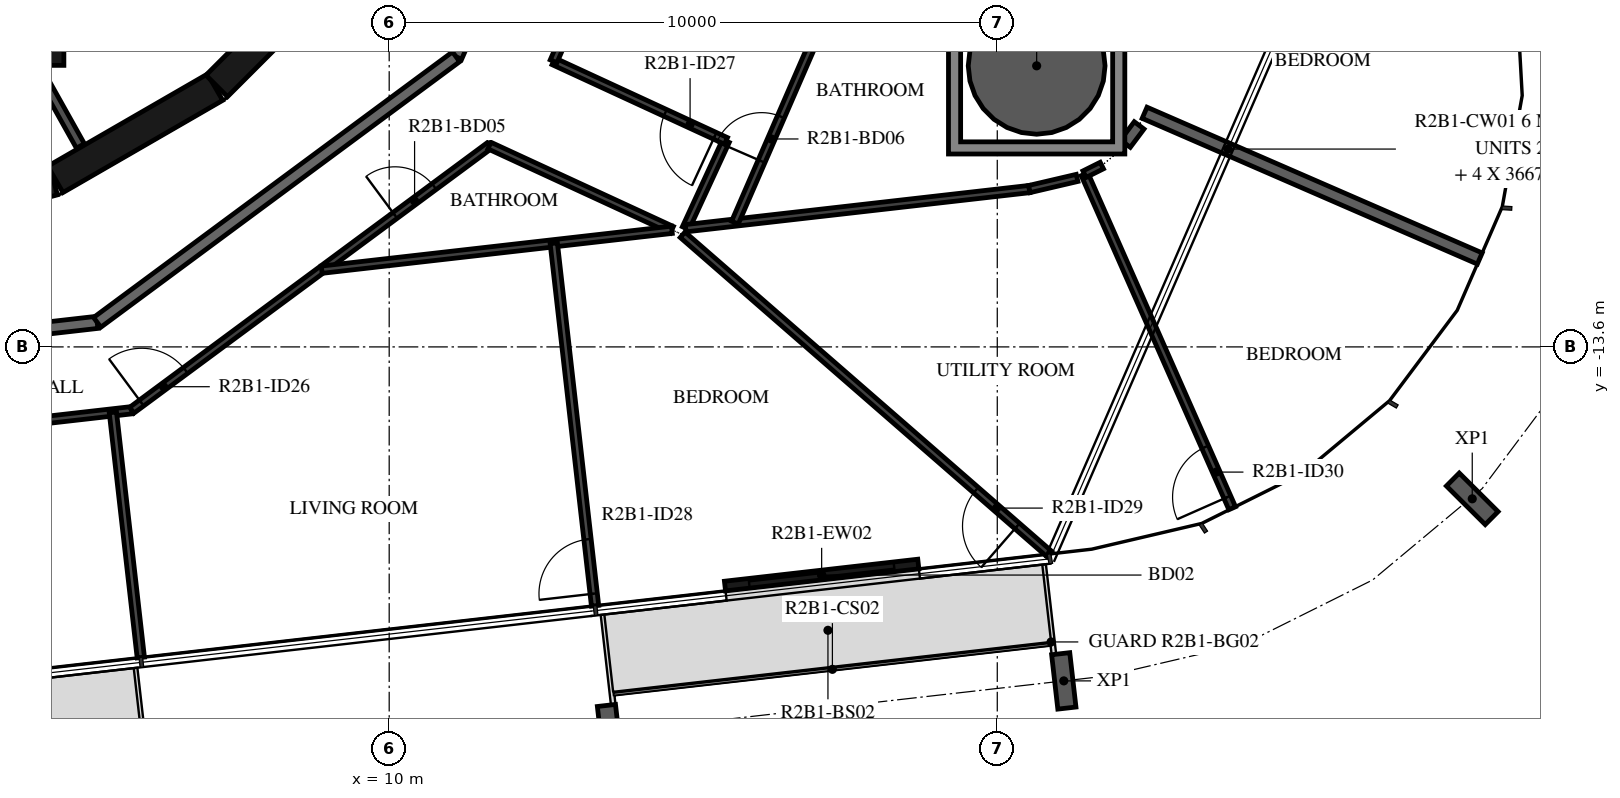
"""IFC4 building model, lengths in metres.
Left out: names, types, materials, properties, quantities, classifications, styles, units other than length and angle.
Written with IfcOpenShell. Run it as: python <this file> out.ifc"""

import sys

from ifc_helpers import new_model, si_unit, direction, frame, frame_2d, origin, origin_2d, place, context, subcontext, project, spatial, polyline, rectangle, hollow_circle, i_section, outline, extrude, element, fill, save


model = new_model("IFC4")
c1 = context("Model", 3, precision=1e-05, world=origin(), true_north=direction((0.0, 1.0)))
c2 = subcontext(c1, "Body", "Model", "MODEL_VIEW")
j1 = project(units=[si_unit("LENGTHUNIT", "METRE"), si_unit("PLANEANGLEUNIT", "RADIAN")], contexts=[c1])
p1 = place(None, origin())
s1 = spatial("IfcSite", under=j1, at=p1, CompositionType="ELEMENT")
p2 = place(p1, origin())
s2 = spatial("IfcBuilding", under=s1, at=p2, CompositionType="ELEMENT")
p3 = place(p2, frame((0.0, 0.0, 87.2)))
s3 = spatial("IfcBuildingStorey", under=s2, at=p3, CompositionType="ELEMENT", Elevation=87.2)
p4 = place(p3, frame((20.648, -8.978, -0.38), z_axis=(0.0, 0.0, 1.0), x_axis=(1.0, 0.0, 0.0)))
e1 = element("IfcColumn", 1, at=p4, inside=s3, PredefinedType="COLUMN", context=c2, shape_type="SweptSolid", body=[
    extrude(hollow_circle(Radius=1.125, WallThickness=0.055, at=origin_2d()), origin(), (0.0, 0.0, 1.0), 3.5),
])
for number, where, z_axis, x_axis in (
    (2, (13.624, -19.944, -0.38), (0.0, 0.0, 1.0), (-0.994, -0.113, 0.0)),
    (3, (21.094, -19.092, -0.38), (0.0, 0.0, 1.0), (-0.994, -0.113, 0.0)),
    (4, (27.811, -16.098, -0.38), (0.0, 0.0, 1.0), (-0.705, -0.709, 0.0)),
):
    element("IfcColumn", number, at=place(p3, frame(where, z_axis=z_axis, x_axis=x_axis)), inside=s3, PredefinedType="COLUMN", context=c2, shape_type="SweptSolid", body=[
        extrude(i_section(OverallWidth=0.3, OverallDepth=0.9, WebThickness=0.019, FlangeThickness=0.035, FilletRadius=0.03, at=origin_2d()), origin(), (0.0, 0.0, 1.0), 3.5),
    ])
p5 = place(p3, frame((15.522, -17.533, 0.0), z_axis=(0.0, 0.0, 1.0), x_axis=(0.993578576686, 0.113144208648, 0.0)))
e5 = element("IfcWall", 5, at=p5, inside=s3, PredefinedType="STANDARD", context=c2, shape_type="SweptSolid", body=[
    extrude(rectangle(XDim=3.2, YDim=0.16, at=frame_2d((1.6, 0.0))), origin(), (0.0, 0.0, 1.0), 3.12),
])
p6 = place(p5, frame((0.4, 0.0, 0.0)))
e6 = element("IfcOpeningElement", 6, at=p6, cuts=e5, PredefinedType="OPENING", context=c2, shape_type="SweptSolid", body=[
    extrude(rectangle(XDim=2.4, YDim=2.4, at=frame_2d((1.2, 1.2))), frame((0.0, 0.09, 0.0), z_axis=(0.0, -1.0, 0.0), x_axis=(1.0, 0.0, 0.0)), (0.0, 0.0, 1.0), 0.18),
])
p7 = place(p3, frame((1.55, -11.643, 0.0), z_axis=(0.0, 0.0, 1.0), x_axis=(0.965948410781, 0.258734743916, 0.0)))
e7 = element("IfcWall", 7, at=p7, inside=s3, PredefinedType="SHEAR", context=c2, shape_type="SweptSolid", body=[
    extrude(rectangle(XDim=3.033, YDim=0.5, at=frame_2d((1.516, 0.0))), origin(), (0.0, 0.0, 1.0), 3.12),
])
p8 = place(p7, frame((1.066, 0.0, 0.0)))
e8 = element("IfcOpeningElement", 8, at=p8, cuts=e7, PredefinedType="OPENING", context=c2, shape_type="SweptSolid", body=[
    extrude(rectangle(XDim=0.9, YDim=2.1, at=frame_2d((0.45, 1.05))), frame((0.0, 0.26, 0.0), z_axis=(0.0, -1.0, 0.0), x_axis=(1.0, 0.0, 0.0)), (0.0, 0.0, 1.0), 0.52),
])
p9 = place(p3, frame((4.51, -10.845, 0.0), z_axis=(0.0, 0.0, 1.0), x_axis=(0.865975092491, 0.500087131594, 0.0)))
e9 = element("IfcWall", 9, at=p9, inside=s3, PredefinedType="SHEAR", context=c2, shape_type="SweptSolid", body=[
    extrude(rectangle(XDim=3.033, YDim=0.5, at=frame_2d((1.516, 0.0))), origin(), (0.0, 0.0, 1.0), 3.12),
])
p10 = place(p3, frame((7.164, -9.308, 0.0), z_axis=(0.0, 0.0, 1.0), x_axis=(0.707106781187, 0.707106781187, 0.0)))
e10 = element("IfcWall", 10, at=p10, inside=s3, PredefinedType="SHEAR", context=c2, shape_type="SweptSolid", body=[
    extrude(rectangle(XDim=3.032, YDim=0.5, at=frame_2d((1.516, 0.0))), origin(), (0.0, 0.0, 1.0), 3.12),
])
p11 = place(p10, frame((1.066, 0.0, 0.0)))
e11 = element("IfcOpeningElement", 11, at=p11, cuts=e10, PredefinedType="OPENING", context=c2, shape_type="SweptSolid", body=[
    extrude(rectangle(XDim=0.9, YDim=2.1, at=frame_2d((0.45, 1.05))), frame((0.0, 0.26, 0.0), z_axis=(0.0, -1.0, 0.0), x_axis=(1.0, 0.0, 0.0)), (0.0, 0.0, 1.0), 0.52),
])
p12 = place(p3, frame((0.1, -8.82, 0.0), z_axis=(0.0, 0.0, 1.0), x_axis=(1.0, 0.0, 0.0)))
e12 = element("IfcWall", 12, at=p12, inside=s3, PredefinedType="SHEAR", context=c2, shape_type="SweptSolid", body=[
    extrude(rectangle(XDim=4.55, YDim=0.3, at=frame_2d((2.275, 0.0))), origin(), (0.0, 0.0, 1.0), 3.12),
])
p13 = place(p3, frame((4.922, -10.296, 0.0), z_axis=(0.0, 0.0, 1.0), x_axis=(-0.48860846254, 0.872503163509, 0.0)))
e13 = element("IfcWall", 13, at=p13, inside=s3, PredefinedType="PARTITIONING", context=c2, shape_type="SweptSolid", body=[
    extrude(rectangle(XDim=1.459, YDim=0.15, at=frame_2d((0.73, 0.0))), origin(), (0.0, 0.0, 1.0), 3.12),
])
p14 = place(p3, frame((11.1, -8.829, 0.0), z_axis=(0.0, 0.0, 1.0), x_axis=(0.398741918631, 0.917063183388, 0.0)))
e14 = element("IfcWall", 14, at=p14, inside=s3, PredefinedType="STANDARD", context=c2, shape_type="SweptSolid", body=[
    extrude(rectangle(XDim=7.342, YDim=0.2, at=frame_2d((3.671, 0.0))), origin(), (0.0, 0.0, 1.0), 3.12),
])
p15 = place(p3, frame((-2.096, -14.028, 0.0), z_axis=(0.0, 0.0, 1.0), x_axis=(0.993569170114, 0.113226782163, 0.0)))
e15 = element("IfcWall", 15, at=p15, inside=s3, PredefinedType="STANDARD", context=c2, shape_type="SweptSolid", body=[
    extrude(rectangle(XDim=7.342, YDim=0.2, at=frame_2d((3.671, 0.0))), origin(), (0.0, 0.0, 1.0), 3.12),
])
p16 = place(p15, frame((0.5, 0.0, 0.0)))
e16 = element("IfcOpeningElement", 16, at=p16, cuts=e15, PredefinedType="OPENING", context=c2, shape_type="SweptSolid", body=[
    extrude(rectangle(XDim=1.0, YDim=2.1, at=frame_2d((0.5, 1.05))), frame((0.0, 0.11, 0.0), z_axis=(0.0, -1.0, 0.0), x_axis=(1.0, 0.0, 0.0)), (0.0, 0.0, 1.0), 0.22),
])
p17 = place(p3, frame((5.198, -13.196, 0.0), z_axis=(0.0, 0.0, 1.0), x_axis=(0.803869883159, 0.594805187394, 0.0)))
e17 = element("IfcWall", 17, at=p17, inside=s3, PredefinedType="STANDARD", context=c2, shape_type="SweptSolid", body=[
    extrude(rectangle(XDim=7.342, YDim=0.2, at=frame_2d((3.671, 0.0))), origin(), (0.0, 0.0, 1.0), 3.12),
])
p18 = place(p3, frame((27.935, -12.146, 0.0), z_axis=(0.0, 0.0, 1.0), x_axis=(-0.917058430913, 0.398752848631, 0.0)))
e18 = element("IfcWall", 18, at=p18, inside=s3, PredefinedType="STANDARD", context=c2, shape_type="SweptSolid", body=[
    extrude(rectangle(XDim=6.01, YDim=0.2, at=frame_2d((3.005, 0.0))), origin(), (0.0, 0.0, 1.0), 3.12),
])
p19 = place(p3, frame((22.333, -9.957, 0.0), z_axis=(0.0, 0.0, 1.0), x_axis=(-0.599479717237, -0.800389947851, 0.0)))
e19 = element("IfcWall", 19, at=p19, inside=s3, PredefinedType="STANDARD", context=c2, shape_type="SweptSolid", body=[
    extrude(rectangle(XDim=0.375, YDim=0.2, at=frame_2d((0.188, 0.0))), origin(), (0.0, 0.0, 1.0), 3.12),
])
p20 = place(p3, frame((3.138, -14.941, 0.0), z_axis=(0.0, 0.0, 1.0), x_axis=(0.99356355736, 0.113276023437, 0.0)))
e20 = element("IfcWall", 20, at=p20, inside=s3, PredefinedType="PARTITIONING", context=c2, shape_type="SweptSolid", body=[
    extrude(rectangle(XDim=2.647, YDim=0.12, at=frame_2d((1.323, 0.0))), origin(), (0.0, 0.0, 1.0), 3.12),
])
p21 = place(p3, frame((5.767, -14.641, 0.0), z_axis=(0.0, 0.0, 1.0), x_axis=(0.803867427863, 0.594808505673, 0.0)))
e21 = element("IfcWall", 21, at=p21, inside=s3, PredefinedType="PARTITIONING", context=c2, shape_type="SweptSolid", body=[
    extrude(rectangle(XDim=7.316, YDim=0.12, at=frame_2d((3.658, 0.0))), origin(), (0.0, 0.0, 1.0), 3.12),
])
p22 = place(p21, frame((0.2, 0.0, 0.0)))
e22 = element("IfcOpeningElement", 22, at=p22, cuts=e21, PredefinedType="OPENING", context=c2, shape_type="SweptSolid", body=[
    extrude(rectangle(XDim=0.9, YDim=2.1, at=frame_2d((0.45, 1.05))), frame((0.0, 0.07, 0.0), z_axis=(0.0, -1.0, 0.0), x_axis=(1.0, 0.0, 0.0)), (0.0, 0.0, 1.0), 0.14),
])
p23 = place(p21, frame((5.385, 0.0, 0.0)))
e23 = element("IfcOpeningElement", 23, at=p23, cuts=e21, PredefinedType="OPENING", context=c2, shape_type="SweptSolid", body=[
    extrude(rectangle(XDim=0.8, YDim=2.1, at=frame_2d((0.4, 1.05))), frame((0.0, 0.07, 0.0), z_axis=(0.0, -1.0, 0.0), x_axis=(1.0, 0.0, 0.0)), (0.0, 0.0, 1.0), 0.14),
])
p24 = place(p3, frame((11.649, -10.289, 0.0), z_axis=(0.0, 0.0, 1.0), x_axis=(0.9079269461, -0.419128453514, 0.0)))
e24 = element("IfcWall", 24, at=p24, inside=s3, PredefinedType="PARTITIONING", context=c2, shape_type="SweptSolid", body=[
    extrude(rectangle(XDim=3.304, YDim=0.12, at=frame_2d((1.652, 0.0))), origin(), (0.0, 0.0, 1.0), 3.12),
])
p25 = place(p3, frame((14.875, -11.648, 0.0), z_axis=(0.0, 0.0, 1.0), x_axis=(0.419087543301, 0.90794583046, 0.0)))
e25 = element("IfcWall", 25, at=p25, inside=s3, PredefinedType="PARTITIONING", context=c2, shape_type="SweptSolid", body=[
    extrude(rectangle(XDim=1.582, YDim=0.12, at=frame_2d((0.791, 0.0))), origin(), (0.0, 0.0, 1.0), 3.12),
])
p26 = place(p3, frame((15.538, -10.212, 0.0), z_axis=(0.0, 0.0, 1.0), x_axis=(-0.907941075756, 0.419097844131, 0.0)))
e26 = element("IfcWall", 26, at=p26, inside=s3, PredefinedType="PARTITIONING", context=c2, shape_type="SweptSolid", body=[
    extrude(rectangle(XDim=3.122, YDim=0.12, at=frame_2d((1.561, 0.0))), origin(), (0.0, 0.0, 1.0), 3.12),
])
p27 = place(p26, frame((0.2, 0.0, 0.0)))
e27 = element("IfcOpeningElement", 27, at=p27, cuts=e26, PredefinedType="OPENING", context=c2, shape_type="SweptSolid", body=[
    extrude(rectangle(XDim=0.9, YDim=2.1, at=frame_2d((0.45, 1.05))), frame((0.0, 0.07, 0.0), z_axis=(0.0, -1.0, 0.0), x_axis=(1.0, 0.0, 0.0)), (0.0, 0.0, 1.0), 0.14),
])
p28 = place(p3, frame((12.703, -8.904, 0.0), z_axis=(0.0, 0.0, 1.0), x_axis=(0.398716154453, 0.917074385303, 0.0)))
e28 = element("IfcWall", 28, at=p28, inside=s3, PredefinedType="PARTITIONING", context=c2, shape_type="SweptSolid", body=[
    extrude(rectangle(XDim=7.173, YDim=0.12, at=frame_2d((3.586, 0.0))), origin(), (0.0, 0.0, 1.0), 3.12),
])
p29 = place(p28, frame((3.3, 0.0, 0.0)))
e29 = element("IfcOpeningElement", 29, at=p29, cuts=e28, PredefinedType="OPENING", context=c2, shape_type="SweptSolid", body=[
    extrude(rectangle(XDim=0.9, YDim=2.1, at=frame_2d((0.45, 1.05))), frame((0.0, 0.07, 0.0), z_axis=(0.0, -1.0, 0.0), x_axis=(1.0, 0.0, 0.0)), (0.0, 0.0, 1.0), 0.14),
])
p30 = place(p3, frame((5.915, -18.708, 0.0), z_axis=(0.0, 0.0, 1.0), x_axis=(-0.113244511591, 0.993567149515, 0.0)))
e30 = element("IfcWall", 30, at=p30, inside=s3, PredefinedType="PARTITIONING", context=c2, shape_type="SweptSolid", body=[
    extrude(rectangle(XDim=4.057, YDim=0.12, at=frame_2d((2.029, 0.0))), origin(), (0.0, 0.0, 1.0), 2.73),
])
p31 = place(p3, frame((14.649, -11.674, 0.0), z_axis=(0.0, 0.0, 1.0), x_axis=(-0.993573746873, -0.113186613721, 0.0)))
e31 = element("IfcWall", 31, at=p31, inside=s3, PredefinedType="PARTITIONING", context=c2, shape_type="SweptSolid", body=[
    extrude(rectangle(XDim=5.796, YDim=0.12, at=frame_2d((2.898, 0.0))), origin(), (0.0, 0.0, 1.0), 3.12),
])
p32 = place(p3, frame((13.386, -17.857, 0.0), z_axis=(0.0, 0.0, 1.0), x_axis=(-0.113200012983, 0.993572220355, 0.0)))
e32 = element("IfcWall", 32, at=p32, inside=s3, PredefinedType="PARTITIONING", context=c2, shape_type="SweptSolid", body=[
    extrude(rectangle(XDim=6.0, YDim=0.12, at=frame_2d((3.0, 0.0))), origin(), (0.0, 0.0, 1.0), 2.73),
])
p33 = place(p32, frame((0.2, 0.0, 0.0)))
e33 = element("IfcOpeningElement", 33, at=p33, cuts=e32, PredefinedType="OPENING", context=c2, shape_type="SweptSolid", body=[
    extrude(rectangle(XDim=0.9, YDim=2.1, at=frame_2d((0.45, 1.05))), frame((0.0, 0.07, 0.0), z_axis=(0.0, -1.0, 0.0), x_axis=(1.0, 0.0, 0.0)), (0.0, 0.0, 1.0), 0.14),
])
p34 = place(p3, frame((20.856, -17.006, 0.0), z_axis=(0.0, 0.0, 1.0), x_axis=(-0.75423134567, 0.656608770281, 0.0)))
e34 = element("IfcWall", 34, at=p34, inside=s3, PredefinedType="PARTITIONING", context=c2, shape_type="SweptSolid", body=[
    extrude(rectangle(XDim=7.995, YDim=0.12, at=frame_2d((3.998, 0.0))), origin(), (0.0, 0.0, 1.0), 3.12),
])
p35 = place(p34, frame((0.7, 0.0, 0.0)))
e35 = element("IfcOpeningElement", 35, at=p35, cuts=e34, PredefinedType="OPENING", context=c2, shape_type="SweptSolid", body=[
    extrude(rectangle(XDim=0.9, YDim=2.1, at=frame_2d((0.45, 1.05))), frame((0.0, 0.07, 0.0), z_axis=(0.0, -1.0, 0.0), x_axis=(1.0, 0.0, 0.0)), (0.0, 0.0, 1.0), 0.14),
])
p36 = place(p3, frame((20.527, -11.004, 0.0), z_axis=(0.0, 0.0, 1.0), x_axis=(-0.993568869194, -0.113229422712, 0.0)))
e36 = element("IfcWall", 36, at=p36, inside=s3, PredefinedType="PARTITIONING", context=c2, shape_type="SweptSolid", body=[
    extrude(rectangle(XDim=5.688, YDim=0.12, at=frame_2d((2.844, 0.0))), origin(), (0.0, 0.0, 1.0), 3.12),
])
p37 = place(p3, frame((21.312, -10.821, 0.0), z_axis=(0.0, 0.0, 1.0), x_axis=(-0.973765266404, -0.227554841621, 0.0)))
e37 = element("IfcWall", 37, at=p37, inside=s3, PredefinedType="PARTITIONING", context=c2, shape_type="SweptSolid", body=[
    extrude(rectangle(XDim=0.807, YDim=0.12, at=frame_2d((0.403, 0.0))), origin(), (0.0, 0.0, 1.0), 3.12),
])
p38 = place(p3, frame((23.864, -16.253, 0.0), z_axis=(0.0, 0.0, 1.0), x_axis=(-0.404274566917, 0.914637673915, 0.0)))
e38 = element("IfcWall", 38, at=p38, inside=s3, PredefinedType="PARTITIONING", context=c2, shape_type="SweptSolid", body=[
    extrude(rectangle(XDim=6.006, YDim=0.12, at=frame_2d((3.003, 0.0))), origin(), (0.0, 0.0, 1.0), 3.12),
])
p39 = place(p38, frame((0.2, 0.0, 0.0)))
e39 = element("IfcOpeningElement", 39, at=p39, cuts=e38, PredefinedType="OPENING", context=c2, shape_type="SweptSolid", body=[
    extrude(rectangle(XDim=0.9, YDim=2.1, at=frame_2d((0.45, 1.05))), frame((0.0, 0.07, 0.0), z_axis=(0.0, -1.0, 0.0), x_axis=(1.0, 0.0, 0.0)), (0.0, 0.0, 1.0), 0.14),
])
p40 = place(p3, frame((15.686, -11.556, 0.0), z_axis=(0.0, 0.0, 1.0), x_axis=(0.398724055903, 0.917070949951, 0.0)))
e40 = element("IfcWall", 40, at=p40, inside=s3, PredefinedType="PARTITIONING", context=c2, shape_type="SweptSolid", body=[
    extrude(rectangle(XDim=4.343, YDim=0.12, at=frame_2d((2.171, 0.0))), origin(), (0.0, 0.0, 1.0), 3.12),
])
p41 = place(p40, frame((1.1, 0.0, 0.0)))
e41 = element("IfcOpeningElement", 41, at=p41, cuts=e40, PredefinedType="OPENING", context=c2, shape_type="SweptSolid", body=[
    extrude(rectangle(XDim=0.8, YDim=2.1, at=frame_2d((0.4, 1.05))), frame((0.0, 0.07, 0.0), z_axis=(0.0, -1.0, 0.0), x_axis=(1.0, 0.0, 0.0)), (0.0, 0.0, 1.0), 0.14),
])
p42 = place(p3, frame((21.435, -10.76, 0.0), z_axis=(0.0, 0.0, 1.0), x_axis=(0.895041493646, 0.445982874841, 0.0)))
e42 = element("IfcWall", 42, at=p42, inside=s3, PredefinedType="PARTITIONING", context=c2, shape_type="SweptSolid", body=[
    extrude(rectangle(XDim=0.317, YDim=0.12, at=frame_2d((0.159, 0.0))), origin(), (0.0, 0.0, 1.0), 3.12),
])
p43 = place(p3, origin())
e43 = element("IfcWall", 43, at=p43, inside=s3, PredefinedType="STANDARD", context=c2, shape_type="SweptSolid", body=[
    extrude(outline(polyline([(22.098, -7.528), (22.098, -10.428), (19.198, -10.428), (19.198, -7.528), (22.098, -7.528)]), holes=[polyline([(19.398, -10.228), (21.898, -10.228), (21.898, -7.728), (19.398, -7.728), (19.398, -10.228)])]), origin(), (0.0, 0.0, 1.0), 3.12),
])
p44 = place(p6, origin())
e44 = element("IfcDoor", 44, at=p44, inside=s3, OperationType="DOUBLE_DOOR_SLIDING", PredefinedType="DOOR", context=c2, shape_type="SweptSolid", body=[
    extrude(rectangle(XDim=2.4, YDim=2.4, at=frame_2d((1.2, 1.2))), frame((0.0, 0.025, 0.0), z_axis=(0.0, -1.0, 0.0), x_axis=(1.0, 0.0, 0.0)), (0.0, 0.0, 1.0), 0.05),
])
fill(e6, e44)
p45 = place(p22, origin())
e45 = element("IfcDoor", 45, at=p45, inside=s3, OperationType="SINGLE_SWING_RIGHT", PredefinedType="DOOR", context=c2, shape_type="SweptSolid", body=[
    extrude(rectangle(XDim=0.9, YDim=2.1, at=frame_2d((0.45, 1.05))), frame((0.0, 0.025, 0.0), z_axis=(0.0, -1.0, 0.0), x_axis=(1.0, 0.0, 0.0)), (0.0, 0.0, 1.0), 0.05),
])
fill(e22, e45)
p46 = place(p23, origin())
e46 = element("IfcDoor", 46, at=p46, inside=s3, OperationType="SINGLE_SWING_RIGHT", PredefinedType="DOOR", context=c2, shape_type="SweptSolid", body=[
    extrude(rectangle(XDim=0.8, YDim=2.1, at=frame_2d((0.4, 1.05))), frame((0.0, 0.025, 0.0), z_axis=(0.0, -1.0, 0.0), x_axis=(1.0, 0.0, 0.0)), (0.0, 0.0, 1.0), 0.05),
])
fill(e23, e46)
p47 = place(p27, origin())
e47 = element("IfcDoor", 47, at=p47, inside=s3, OperationType="SINGLE_SWING_LEFT", PredefinedType="DOOR", context=c2, shape_type="SweptSolid", body=[
    extrude(rectangle(XDim=0.9, YDim=2.1, at=frame_2d((0.45, 1.05))), frame((0.0, 0.025, 0.0), z_axis=(0.0, -1.0, 0.0), x_axis=(1.0, 0.0, 0.0)), (0.0, 0.0, 1.0), 0.05),
])
fill(e27, e47)
p48 = place(p33, origin())
e48 = element("IfcDoor", 48, at=p48, inside=s3, OperationType="SINGLE_SWING_RIGHT", PredefinedType="DOOR", context=c2, shape_type="SweptSolid", body=[
    extrude(rectangle(XDim=0.9, YDim=2.1, at=frame_2d((0.45, 1.05))), frame((0.0, 0.025, 0.0), z_axis=(0.0, -1.0, 0.0), x_axis=(1.0, 0.0, 0.0)), (0.0, 0.0, 1.0), 0.05),
])
fill(e33, e48)
p49 = place(p41, origin())
e49 = element("IfcDoor", 49, at=p49, inside=s3, OperationType="SINGLE_SWING_RIGHT", PredefinedType="DOOR", context=c2, shape_type="SweptSolid", body=[
    extrude(rectangle(XDim=0.8, YDim=2.1, at=frame_2d((0.4, 1.05))), frame((0.0, 0.025, 0.0), z_axis=(0.0, -1.0, 0.0), x_axis=(1.0, 0.0, 0.0)), (0.0, 0.0, 1.0), 0.05),
])
fill(e41, e49)
p50 = place(p35, origin())
e50 = element("IfcDoor", 50, at=p50, inside=s3, OperationType="SINGLE_SWING_RIGHT", PredefinedType="DOOR", context=c2, shape_type="SweptSolid", body=[
    extrude(rectangle(XDim=0.9, YDim=2.1, at=frame_2d((0.45, 1.05))), frame((0.0, 0.025, 0.0), z_axis=(0.0, -1.0, 0.0), x_axis=(1.0, 0.0, 0.0)), (0.0, 0.0, 1.0), 0.05),
])
fill(e35, e50)
p51 = place(p39, origin())
e51 = element("IfcDoor", 51, at=p51, inside=s3, OperationType="SINGLE_SWING_RIGHT", PredefinedType="DOOR", context=c2, shape_type="SweptSolid", body=[
    extrude(rectangle(XDim=0.9, YDim=2.1, at=frame_2d((0.45, 1.05))), frame((0.0, 0.025, 0.0), z_axis=(0.0, -1.0, 0.0), x_axis=(1.0, 0.0, 0.0)), (0.0, 0.0, 1.0), 0.05),
])
fill(e39, e51)
save(model, sys.argv[1])
